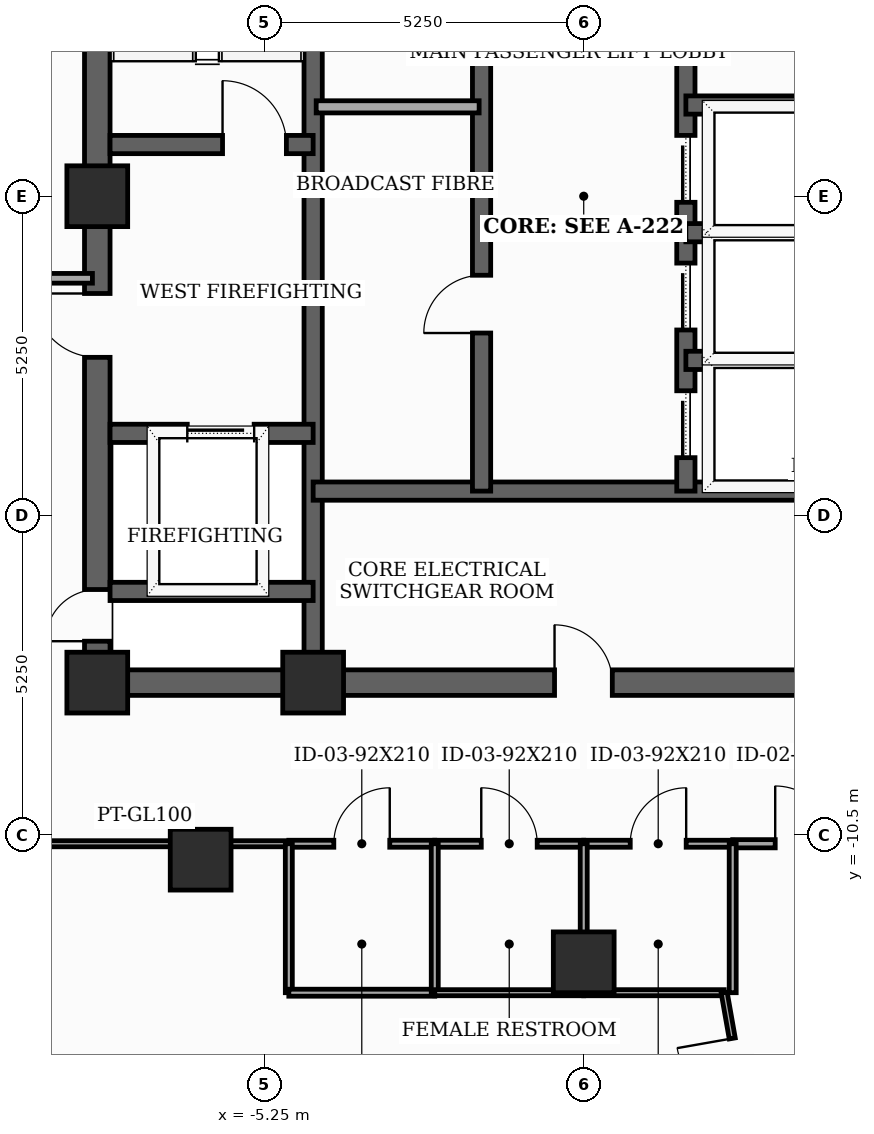
"""IFC4 building model, lengths in metres.
Left out: names, types, materials, properties, quantities, classifications, styles, units other than length and angle.
Written with IfcOpenShell. Run it as: python <this file> out.ifc"""

import sys

from ifc_helpers import new_model, si_unit, direction, frame, frame_2d, origin, origin_2d, place, context, subcontext, project, spatial, rectangle, extrude, element, fill, save


model = new_model("IFC4")
c1 = context("Model", 3, precision=1e-05, world=origin(), true_north=direction((0.0, 1.0)))
c2 = subcontext(c1, "Body", "Model", "MODEL_VIEW")
j1 = project(units=[si_unit("LENGTHUNIT", "METRE"), si_unit("PLANEANGLEUNIT", "RADIAN")], contexts=[c1])
p1 = place(None, origin())
s1 = spatial("IfcSite", under=j1, at=p1, CompositionType="ELEMENT")
p2 = place(p1, origin())
s2 = spatial("IfcBuilding", under=s1, at=p2, CompositionType="ELEMENT")
p3 = place(p2, frame((0.0, 0.0, 248.5)))
s3 = spatial("IfcBuildingStorey", under=s2, at=p3, CompositionType="ELEMENT", Elevation=248.5)
for number, where, z_axis, x_axis in (
    (1, (-8.0, -8.0, 0.0), (0.0, 0.0, 1.0), (1.0, 0.0, 0.0)),
    (2, (-4.45, -8.0, 0.0), (0.0, 0.0, 1.0), (1.0, 0.0, 0.0)),
    (3, (-8.0, 0.0, 0.0), (0.0, 0.0, 1.0), (1.0, 0.0, 0.0)),
    (4, (-6.3, -10.912, 0.0), (0.0, 0.0, 1.0), (1.0, 0.0, 0.0)),
    (5, (0.0, -12.6, 0.0), (0.0, 0.0, 1.0), (1.0, 0.0, 0.0)),
):
    element("IfcColumn", number, at=place(p3, frame(where, z_axis=z_axis, x_axis=x_axis)), inside=s3, PredefinedType="COLUMN", context=c2, shape_type="SweptSolid", body=[
        extrude(rectangle(XDim=1.0, YDim=1.0, at=origin_2d()), origin(), (0.0, 0.0, 1.0), 3.7),
    ])
p4 = place(p3, frame((-8.0, -8.0, 0.0), z_axis=(0.0, 0.0, 1.0), x_axis=(0.0, 1.0, 0.0)))
e6 = element("IfcWall", 6, at=p4, inside=s3, PredefinedType="SHEAR", context=c2, shape_type="SweptSolid", body=[
    extrude(rectangle(XDim=16.0, YDim=0.42, at=frame_2d((8.0, 0.0))), origin(), (0.0, 0.0, 1.0), 3.5),
])
p5 = place(p4, frame((0.681, 0.0, 0.0)))
e7 = element("IfcOpeningElement", 7, at=p5, cuts=e6, PredefinedType="OPENING", context=c2, shape_type="SweptSolid", body=[
    extrude(rectangle(XDim=0.85, YDim=2.02, at=frame_2d((0.425, 1.01))), frame((0.0, 0.22, 0.0), z_axis=(0.0, -1.0, 0.0), x_axis=(1.0, 0.0, 0.0)), (0.0, 0.0, 1.0), 0.44),
])
p6 = place(p4, frame((5.35, 0.0, 0.0)))
e8 = element("IfcOpeningElement", 8, at=p6, cuts=e6, PredefinedType="OPENING", context=c2, shape_type="SweptSolid", body=[
    extrude(rectangle(XDim=1.05, YDim=2.15, at=frame_2d((0.525, 1.075))), frame((0.0, 0.22, 0.0), z_axis=(0.0, -1.0, 0.0), x_axis=(1.0, 0.0, 0.0)), (0.0, 0.0, 1.0), 0.44),
])
p7 = place(p3, frame((-8.0, -8.0, 0.0), z_axis=(0.0, 0.0, 1.0), x_axis=(1.0, 0.0, 0.0)))
e9 = element("IfcWall", 9, at=p7, inside=s3, PredefinedType="SHEAR", context=c2, shape_type="SweptSolid", body=[
    extrude(rectangle(XDim=16.0, YDim=0.42, at=frame_2d((8.0, 0.0))), origin(), (0.0, 0.0, 1.0), 3.5),
])
p8 = place(p7, frame((7.52, 0.0, 0.0)))
e10 = element("IfcOpeningElement", 10, at=p8, cuts=e9, PredefinedType="OPENING", context=c2, shape_type="SweptSolid", body=[
    extrude(rectangle(XDim=0.95, YDim=2.1, at=frame_2d((0.475, 1.05))), frame((0.0, 0.22, 0.0), z_axis=(0.0, -1.0, 0.0), x_axis=(1.0, 0.0, 0.0)), (0.0, 0.0, 1.0), 0.44),
])
p9 = place(p3, frame((-4.45, -7.79, 0.0), z_axis=(0.0, 0.0, 1.0), x_axis=(0.0, 1.0, 0.0)))
e11 = element("IfcWall", 11, at=p9, inside=s3, PredefinedType="SHEAR", context=c2, shape_type="SweptSolid", body=[
    extrude(rectangle(XDim=15.58, YDim=0.3, at=frame_2d((7.79, 0.0))), origin(), (0.0, 0.0, 1.0), 3.5),
])
p10 = place(p3, frame((-7.79, 0.85, 0.0), z_axis=(0.0, 0.0, 1.0), x_axis=(1.0, 0.0, 0.0)))
e12 = element("IfcWall", 12, at=p10, inside=s3, PredefinedType="SHEAR", context=c2, shape_type="SweptSolid", body=[
    extrude(rectangle(XDim=3.34, YDim=0.3, at=frame_2d((1.67, 0.0))), origin(), (0.0, 0.0, 1.0), 3.5),
])
p11 = place(p10, frame((1.85, 0.0, 0.0)))
e13 = element("IfcOpeningElement", 13, at=p11, cuts=e12, PredefinedType="OPENING", context=c2, shape_type="SweptSolid", body=[
    extrude(rectangle(XDim=1.05, YDim=2.15, at=frame_2d((0.525, 1.075))), frame((0.0, 0.16, 0.0), z_axis=(0.0, -1.0, 0.0), x_axis=(1.0, 0.0, 0.0)), (0.0, 0.0, 1.0), 0.32),
])
p12 = place(p3, frame((-7.79, -3.9, 0.0), z_axis=(0.0, 0.0, 1.0), x_axis=(1.0, 0.0, 0.0)))
e14 = element("IfcWall", 14, at=p12, inside=s3, PredefinedType="SHEAR", context=c2, shape_type="SweptSolid", body=[
    extrude(rectangle(XDim=3.34, YDim=0.3, at=frame_2d((1.67, 0.0))), origin(), (0.0, 0.0, 1.0), 3.5),
])
p13 = place(p12, frame((1.27, 0.0, 0.0)))
e15 = element("IfcOpeningElement", 15, at=p13, cuts=e14, PredefinedType="OPENING", context=c2, shape_type="SweptSolid", body=[
    extrude(rectangle(XDim=1.1, YDim=2.1, at=frame_2d((0.55, 1.05))), frame((0.0, 0.16, 0.0), z_axis=(0.0, -1.0, 0.0), x_axis=(1.0, 0.0, 0.0)), (0.0, 0.0, 1.0), 0.32),
])
p14 = place(p3, frame((-7.79, -6.5, 0.0), z_axis=(0.0, 0.0, 1.0), x_axis=(1.0, 0.0, 0.0)))
e16 = element("IfcWall", 16, at=p14, inside=s3, PredefinedType="SHEAR", context=c2, shape_type="SweptSolid", body=[
    extrude(rectangle(XDim=3.34, YDim=0.3, at=frame_2d((1.67, 0.0))), origin(), (0.0, 0.0, 1.0), 3.5),
])
p15 = place(p3, frame((-4.45, -4.85, 0.0), z_axis=(0.0, 0.0, 1.0), x_axis=(1.0, 0.0, 0.0)))
e17 = element("IfcWall", 17, at=p15, inside=s3, PredefinedType="SHEAR", context=c2, shape_type="SweptSolid", body=[
    extrude(rectangle(XDim=8.9, YDim=0.3, at=frame_2d((4.45, 0.0))), origin(), (0.0, 0.0, 1.0), 3.5),
])
p16 = place(p3, frame((-1.68, -4.85, 0.0), z_axis=(0.0, 0.0, 1.0), x_axis=(0.0, 1.0, 0.0)))
e18 = element("IfcWall", 18, at=p16, inside=s3, PredefinedType="SHEAR", context=c2, shape_type="SweptSolid", body=[
    extrude(rectangle(XDim=12.64, YDim=0.3, at=frame_2d((6.32, 0.0))), origin(), (0.0, 0.0, 1.0), 3.5),
])
p17 = place(p16, frame((2.6, 0.0, 0.0)))
e19 = element("IfcOpeningElement", 19, at=p17, cuts=e18, PredefinedType="OPENING", context=c2, shape_type="SweptSolid", body=[
    extrude(rectangle(XDim=0.95, YDim=2.1, at=frame_2d((0.475, 1.05))), frame((0.0, 0.16, 0.0), z_axis=(0.0, -1.0, 0.0), x_axis=(1.0, 0.0, 0.0)), (0.0, 0.0, 1.0), 0.32),
])
p18 = place(p16, frame((8.8, 0.0, 0.0)))
e20 = element("IfcOpeningElement", 20, at=p18, cuts=e18, PredefinedType="OPENING", context=c2, shape_type="SweptSolid", body=[
    extrude(rectangle(XDim=0.95, YDim=2.1, at=frame_2d((0.475, 1.05))), frame((0.0, 0.16, 0.0), z_axis=(0.0, -1.0, 0.0), x_axis=(1.0, 0.0, 0.0)), (0.0, 0.0, 1.0), 0.32),
])
p19 = place(p3, frame((1.68, -4.85, 0.0), z_axis=(0.0, 0.0, 1.0), x_axis=(0.0, 1.0, 0.0)))
e21 = element("IfcWall", 21, at=p19, inside=s3, PredefinedType="SHEAR", context=c2, shape_type="SweptSolid", body=[
    extrude(rectangle(XDim=12.64, YDim=0.3, at=frame_2d((6.32, 0.0))), origin(), (0.0, 0.0, 1.0), 3.5),
])
p20 = place(p19, frame((0.55, 0.0, 0.0)))
e22 = element("IfcOpeningElement", 22, at=p20, cuts=e21, PredefinedType="OPENING", context=c2, shape_type="SweptSolid", body=[
    extrude(rectangle(XDim=1.1, YDim=2.1, at=frame_2d((0.55, 1.05))), frame((0.0, 0.16, 0.0), z_axis=(0.0, -1.0, 0.0), x_axis=(1.0, 0.0, 0.0)), (0.0, 0.0, 1.0), 0.32),
])
p21 = place(p19, frame((2.65, 0.0, 0.0)))
e23 = element("IfcOpeningElement", 23, at=p21, cuts=e21, PredefinedType="OPENING", context=c2, shape_type="SweptSolid", body=[
    extrude(rectangle(XDim=1.1, YDim=2.1, at=frame_2d((0.55, 1.05))), frame((0.0, 0.16, 0.0), z_axis=(0.0, -1.0, 0.0), x_axis=(1.0, 0.0, 0.0)), (0.0, 0.0, 1.0), 0.32),
])
p22 = place(p19, frame((4.75, 0.0, 0.0)))
e24 = element("IfcOpeningElement", 24, at=p22, cuts=e21, PredefinedType="OPENING", context=c2, shape_type="SweptSolid", body=[
    extrude(rectangle(XDim=1.1, YDim=2.1, at=frame_2d((0.55, 1.05))), frame((0.0, 0.16, 0.0), z_axis=(0.0, -1.0, 0.0), x_axis=(1.0, 0.0, 0.0)), (0.0, 0.0, 1.0), 0.32),
])
p23 = place(p19, frame((8.9, 0.0, 0.0)))
e25 = element("IfcOpeningElement", 25, at=p23, cuts=e21, PredefinedType="OPENING", context=c2, shape_type="SweptSolid", body=[
    extrude(rectangle(XDim=0.95, YDim=2.1, at=frame_2d((0.475, 1.05))), frame((0.0, 0.16, 0.0), z_axis=(0.0, -1.0, 0.0), x_axis=(1.0, 0.0, 0.0)), (0.0, 0.0, 1.0), 0.32),
])
for number, where, z_axis, x_axis in (
    (26, (1.68, 1.5, 0.0), (0.0, 0.0, 1.0), (1.0, 0.0, 0.0)),
    (27, (1.68, -2.7, 0.0), (0.0, 0.0, 1.0), (1.0, 0.0, 0.0)),
    (28, (1.68, -0.6, 0.0), (0.0, 0.0, 1.0), (1.0, 0.0, 0.0)),
):
    element("IfcWall", number, at=place(p3, frame(where, z_axis=z_axis, x_axis=x_axis)), inside=s3, PredefinedType="SHEAR", context=c2, shape_type="SweptSolid", body=[
        extrude(rectangle(XDim=2.77, YDim=0.3, at=frame_2d((1.385, 0.0))), origin(), (0.0, 0.0, 1.0), 3.5),
    ])
p24 = place(p3, frame((-4.4, 1.47, 0.0), z_axis=(0.0, 0.0, 1.0), x_axis=(1.0, 0.0, 0.0)))
e29 = element("IfcWall", 29, at=p24, inside=s3, PredefinedType="SOLIDWALL", context=c2, shape_type="SweptSolid", body=[
    extrude(rectangle(XDim=2.68, YDim=0.2, at=frame_2d((1.34, 0.0))), origin(), (0.0, 0.0, 1.0), 3.5),
])
p25 = place(p3, frame((-8.08, -1.35, 0.0), z_axis=(0.0, 0.0, 1.0), x_axis=(-1.0, 0.0, 0.0)))
e30 = element("IfcWall", 30, at=p25, inside=s3, PredefinedType="PARTITIONING", context=c2, shape_type="SweptSolid", body=[
    extrude(rectangle(XDim=2.57, YDim=0.16, at=frame_2d((1.285, 0.0))), origin(), (0.0, 0.0, 1.0), 2.885),
])
p26 = place(p3, frame((-4.85, -10.65, 0.0), z_axis=(0.0, 0.0, 1.0), x_axis=(1.0, 0.0, 0.0)))
e31 = element("IfcWall", 31, at=p26, inside=s3, PredefinedType="PARTITIONING", context=c2, shape_type="SweptSolid", body=[
    extrude(rectangle(XDim=2.4, YDim=0.115, at=frame_2d((1.2, 0.0))), origin(), (0.0, 0.0, 1.0), 3.5),
])
p27 = place(p26, frame((0.74, 0.0, 0.0)))
e32 = element("IfcOpeningElement", 32, at=p27, cuts=e31, PredefinedType="OPENING", context=c2, shape_type="SweptSolid", body=[
    extrude(rectangle(XDim=0.92, YDim=2.1, at=frame_2d((0.46, 1.05))), frame((0.0, 0.067, 0.0), z_axis=(0.0, -1.0, 0.0), x_axis=(1.0, 0.0, 0.0)), (0.0, 0.0, 1.0), 0.135),
])
p28 = place(p3, frame((-9.589, -10.65, 0.0), z_axis=(0.0, 0.0, 1.0), x_axis=(1.0, 0.0, 0.0)))
e33 = element("IfcWall", 33, at=p28, inside=s3, PredefinedType="MOVABLE", context=c2, shape_type="SweptSolid", body=[
    extrude(rectangle(XDim=4.739, YDim=0.1, at=frame_2d((2.37, 0.0))), origin(), (0.0, 0.0, 1.0), 2.885),
])
p29 = place(p3, frame((-2.45, -10.65, 0.0), z_axis=(0.0, 0.0, 1.0), x_axis=(1.0, 0.0, 0.0)))
e34 = element("IfcWall", 34, at=p29, inside=s3, PredefinedType="PARTITIONING", context=c2, shape_type="SweptSolid", body=[
    extrude(rectangle(XDim=2.45, YDim=0.115, at=frame_2d((1.225, 0.0))), origin(), (0.0, 0.0, 1.0), 2.885),
])
p30 = place(p29, frame((0.765, 0.0, 0.0)))
e35 = element("IfcOpeningElement", 35, at=p30, cuts=e34, PredefinedType="OPENING", context=c2, shape_type="SweptSolid", body=[
    extrude(rectangle(XDim=0.92, YDim=2.1, at=frame_2d((0.46, 1.05))), frame((0.0, 0.067, 0.0), z_axis=(0.0, -1.0, 0.0), x_axis=(1.0, 0.0, 0.0)), (0.0, 0.0, 1.0), 0.135),
])
p31 = place(p3, frame((0.0, -10.65, 0.0), z_axis=(0.0, 0.0, 1.0), x_axis=(1.0, 0.0, 0.0)))
e36 = element("IfcWall", 36, at=p31, inside=s3, PredefinedType="PARTITIONING", context=c2, shape_type="SweptSolid", body=[
    extrude(rectangle(XDim=2.45, YDim=0.115, at=frame_2d((1.225, 0.0))), origin(), (0.0, 0.0, 1.0), 3.5),
])
p32 = place(p31, frame((0.765, 0.0, 0.0)))
e37 = element("IfcOpeningElement", 37, at=p32, cuts=e36, PredefinedType="OPENING", context=c2, shape_type="SweptSolid", body=[
    extrude(rectangle(XDim=0.92, YDim=2.1, at=frame_2d((0.46, 1.05))), frame((0.0, 0.067, 0.0), z_axis=(0.0, -1.0, 0.0), x_axis=(1.0, 0.0, 0.0)), (0.0, 0.0, 1.0), 0.135),
])
p33 = place(p3, frame((2.45, -10.65, 0.0), z_axis=(0.0, 0.0, 1.0), x_axis=(1.0, 0.0, 0.0)))
e38 = element("IfcWall", 38, at=p33, inside=s3, PredefinedType="PARTITIONING", context=c2, shape_type="SweptSolid", body=[
    extrude(rectangle(XDim=5.871, YDim=0.135, at=frame_2d((2.936, 0.0))), origin(), (0.0, 0.0, 1.0), 2.075),
])
p34 = place(p33, frame((0.699, 0.0, 0.0)))
e39 = element("IfcOpeningElement", 39, at=p34, cuts=e38, PredefinedType="OPENING", context=c2, shape_type="SweptSolid", body=[
    extrude(rectangle(XDim=0.95, YDim=2.025, at=frame_2d((0.475, 1.012))), frame((0.0, 0.077, 0.0), z_axis=(0.0, -1.0, 0.0), x_axis=(1.0, 0.0, 0.0)), (0.0, 0.0, 1.0), 0.155),
])
p35 = place(p3, frame((-4.85, -10.65, 0.0), z_axis=(0.0, 0.0, 1.0), x_axis=(0.0, -1.0, 0.0)))
e40 = element("IfcWall", 40, at=p35, inside=s3, PredefinedType="PARTITIONING", context=c2, shape_type="SweptSolid", body=[
    extrude(rectangle(XDim=2.45, YDim=0.115, at=frame_2d((1.225, 0.0))), origin(), (0.0, 0.0, 1.0), 2.885),
])
p36 = place(p3, frame((-4.85, -13.1, 0.0), z_axis=(0.0, 0.0, 1.0), x_axis=(1.0, 0.0, 0.0)))
e41 = element("IfcWall", 41, at=p36, inside=s3, PredefinedType="PARTITIONING", context=c2, shape_type="SweptSolid", body=[
    extrude(rectangle(XDim=2.4, YDim=0.115, at=frame_2d((1.2, 0.0))), origin(), (0.0, 0.0, 1.0), 3.5),
])
p37 = place(p3, frame((-2.45, -13.1, 0.0), z_axis=(0.0, 0.0, 1.0), x_axis=(0.0, 1.0, 0.0)))
e42 = element("IfcWall", 42, at=p37, inside=s3, PredefinedType="PARTITIONING", context=c2, shape_type="SweptSolid", body=[
    extrude(rectangle(XDim=2.45, YDim=0.115, at=frame_2d((1.225, 0.0))), origin(), (0.0, 0.0, 1.0), 2.885),
])
p38 = place(p3, frame((0.0, -13.1, 0.0), z_axis=(0.0, 0.0, 1.0), x_axis=(-1.0, 0.0, 0.0)))
e43 = element("IfcWall", 43, at=p38, inside=s3, PredefinedType="MOVABLE", context=c2, shape_type="SweptSolid", body=[
    extrude(rectangle(XDim=2.45, YDim=0.1, at=frame_2d((1.225, 0.0))), origin(), (0.0, 0.0, 1.0), 3.5),
])
p39 = place(p3, frame((2.31, -13.1, 0.0), z_axis=(0.0, 0.0, 1.0), x_axis=(-1.0, 0.0, 0.0)))
e44 = element("IfcWall", 44, at=p39, inside=s3, PredefinedType="MOVABLE", context=c2, shape_type="SweptSolid", body=[
    extrude(rectangle(XDim=2.31, YDim=0.1, at=frame_2d((1.155, 0.0))), origin(), (0.0, 0.0, 1.0), 3.5),
])
p40 = place(p3, frame((2.735, -15.51, 0.0), z_axis=(0.0, 0.0, 1.0), x_axis=(-0.173694270709, 0.984799624453, 0.0)))
e45 = element("IfcWall", 45, at=p40, inside=s3, PredefinedType="MOVABLE", context=c2, shape_type="SweptSolid", body=[
    extrude(rectangle(XDim=2.447, YDim=0.1, at=frame_2d((1.224, 0.0))), origin(), (0.0, 0.0, 1.0), 3.185),
])
p41 = place(p40, frame((0.764, 0.0, 0.0)))
e46 = element("IfcOpeningElement", 46, at=p41, cuts=e45, PredefinedType="OPENING", context=c2, shape_type="SweptSolid", body=[
    extrude(rectangle(XDim=0.92, YDim=2.1, at=frame_2d((0.46, 1.05))), frame((0.0, 0.06, 0.0), z_axis=(0.0, -1.0, 0.0), x_axis=(1.0, 0.0, 0.0)), (0.0, 0.0, 1.0), 0.12),
])
for number, where, z_axis, x_axis in (
    (47, (0.0, -13.1, 0.0), (0.0, 0.0, 1.0), (0.0, 1.0, 0.0)),
    (48, (2.45, -13.1, 0.0), (0.0, 0.0, 1.0), (0.0, 1.0, 0.0)),
):
    element("IfcWall", number, at=place(p3, frame(where, z_axis=z_axis, x_axis=x_axis)), inside=s3, PredefinedType="PARTITIONING", context=c2, shape_type="SweptSolid", body=[
        extrude(rectangle(XDim=2.45, YDim=0.115, at=frame_2d((1.225, 0.0))), origin(), (0.0, 0.0, 1.0), 2.885),
    ])
p42 = place(p5, origin())
e49 = element("IfcDoor", 49, at=p42, inside=s3, OperationType="SINGLE_SWING_LEFT", PredefinedType="TRAPDOOR", context=c2, shape_type="SweptSolid", body=[
    extrude(rectangle(XDim=0.85, YDim=2.02, at=frame_2d((0.425, 1.01))), frame((0.0, 0.025, 0.0), z_axis=(0.0, -1.0, 0.0), x_axis=(1.0, 0.0, 0.0)), (0.0, 0.0, 1.0), 0.05),
])
fill(e7, e49)
p43 = place(p6, origin())
e50 = element("IfcDoor", 50, at=p43, inside=s3, OperationType="SINGLE_SWING_RIGHT", PredefinedType="DOOR", context=c2, shape_type="SweptSolid", body=[
    extrude(rectangle(XDim=1.05, YDim=2.15, at=frame_2d((0.525, 1.075))), frame((0.0, 0.025, 0.0), z_axis=(0.0, -1.0, 0.0), x_axis=(1.0, 0.0, 0.0)), (0.0, 0.0, 1.0), 0.05),
])
fill(e8, e50)
p44 = place(p8, origin())
e51 = element("IfcDoor", 51, at=p44, inside=s3, OperationType="SINGLE_SWING_LEFT", PredefinedType="DOOR", context=c2, shape_type="SweptSolid", body=[
    extrude(rectangle(XDim=0.95, YDim=2.1, at=frame_2d((0.475, 1.05))), frame((0.0, 0.025, 0.0), z_axis=(0.0, -1.0, 0.0), x_axis=(1.0, 0.0, 0.0)), (0.0, 0.0, 1.0), 0.05),
])
fill(e10, e51)
p45 = place(p11, origin())
e52 = element("IfcDoor", 52, at=p45, inside=s3, OperationType="SINGLE_SWING_LEFT", PredefinedType="DOOR", context=c2, shape_type="SweptSolid", body=[
    extrude(rectangle(XDim=1.05, YDim=2.15, at=frame_2d((0.525, 1.075))), frame((0.0, 0.025, 0.0), z_axis=(0.0, -1.0, 0.0), x_axis=(1.0, 0.0, 0.0)), (0.0, 0.0, 1.0), 0.05),
])
fill(e13, e52)
p46 = place(p13, origin())
e53 = element("IfcDoor", 53, at=p46, inside=s3, OperationType="SLIDING_TO_LEFT", PredefinedType="DOOR", context=c2, shape_type="SweptSolid", body=[
    extrude(rectangle(XDim=1.1, YDim=2.1, at=frame_2d((0.55, 1.05))), frame((0.0, 0.025, 0.0), z_axis=(0.0, -1.0, 0.0), x_axis=(1.0, 0.0, 0.0)), (0.0, 0.0, 1.0), 0.05),
])
fill(e15, e53)
p47 = place(p17, origin())
e54 = element("IfcDoor", 54, at=p47, inside=s3, OperationType="SINGLE_SWING_LEFT", PredefinedType="DOOR", context=c2, shape_type="SweptSolid", body=[
    extrude(rectangle(XDim=0.95, YDim=2.1, at=frame_2d((0.475, 1.05))), frame((0.0, 0.025, 0.0), z_axis=(0.0, -1.0, 0.0), x_axis=(1.0, 0.0, 0.0)), (0.0, 0.0, 1.0), 0.05),
])
fill(e19, e54)
p48 = place(p20, origin())
e55 = element("IfcDoor", 55, at=p48, inside=s3, OperationType="SLIDING_TO_LEFT", PredefinedType="DOOR", context=c2, shape_type="SweptSolid", body=[
    extrude(rectangle(XDim=1.1, YDim=2.1, at=frame_2d((0.55, 1.05))), frame((0.0, 0.025, 0.0), z_axis=(0.0, -1.0, 0.0), x_axis=(1.0, 0.0, 0.0)), (0.0, 0.0, 1.0), 0.05),
])
fill(e22, e55)
p49 = place(p21, origin())
e56 = element("IfcDoor", 56, at=p49, inside=s3, OperationType="SLIDING_TO_LEFT", PredefinedType="DOOR", context=c2, shape_type="SweptSolid", body=[
    extrude(rectangle(XDim=1.1, YDim=2.1, at=frame_2d((0.55, 1.05))), frame((0.0, 0.025, 0.0), z_axis=(0.0, -1.0, 0.0), x_axis=(1.0, 0.0, 0.0)), (0.0, 0.0, 1.0), 0.05),
])
fill(e23, e56)
p50 = place(p22, origin())
e57 = element("IfcDoor", 57, at=p50, inside=s3, OperationType="SLIDING_TO_LEFT", PredefinedType="DOOR", context=c2, shape_type="SweptSolid", body=[
    extrude(rectangle(XDim=1.1, YDim=2.1, at=frame_2d((0.55, 1.05))), frame((0.0, 0.025, 0.0), z_axis=(0.0, -1.0, 0.0), x_axis=(1.0, 0.0, 0.0)), (0.0, 0.0, 1.0), 0.05),
])
fill(e24, e57)
p51 = place(p27, origin())
e58 = element("IfcDoor", 58, at=p51, inside=s3, OperationType="SINGLE_SWING_RIGHT", PredefinedType="DOOR", context=c2, shape_type="SweptSolid", body=[
    extrude(rectangle(XDim=0.92, YDim=2.1, at=frame_2d((0.46, 1.05))), frame((0.0, 0.025, 0.0), z_axis=(0.0, -1.0, 0.0), x_axis=(1.0, 0.0, 0.0)), (0.0, 0.0, 1.0), 0.05),
])
fill(e32, e58)
p52 = place(p30, origin())
e59 = element("IfcDoor", 59, at=p52, inside=s3, OperationType="SINGLE_SWING_LEFT", PredefinedType="DOOR", context=c2, shape_type="SweptSolid", body=[
    extrude(rectangle(XDim=0.92, YDim=2.1, at=frame_2d((0.46, 1.05))), frame((0.0, 0.025, 0.0), z_axis=(0.0, -1.0, 0.0), x_axis=(1.0, 0.0, 0.0)), (0.0, 0.0, 1.0), 0.05),
])
fill(e35, e59)
p53 = place(p32, origin())
e60 = element("IfcDoor", 60, at=p53, inside=s3, OperationType="SINGLE_SWING_RIGHT", PredefinedType="DOOR", context=c2, shape_type="SweptSolid", body=[
    extrude(rectangle(XDim=0.92, YDim=2.1, at=frame_2d((0.46, 1.05))), frame((0.0, 0.025, 0.0), z_axis=(0.0, -1.0, 0.0), x_axis=(1.0, 0.0, 0.0)), (0.0, 0.0, 1.0), 0.05),
])
fill(e37, e60)
p54 = place(p34, origin())
e61 = element("IfcDoor", 61, at=p54, inside=s3, OperationType="SINGLE_SWING_LEFT", PredefinedType="DOOR", context=c2, shape_type="SweptSolid", body=[
    extrude(rectangle(XDim=0.95, YDim=2.025, at=frame_2d((0.475, 1.012))), frame((0.0, 0.025, 0.0), z_axis=(0.0, -1.0, 0.0), x_axis=(1.0, 0.0, 0.0)), (0.0, 0.0, 1.0), 0.05),
])
fill(e39, e61)
p55 = place(p41, origin())
e62 = element("IfcDoor", 62, at=p55, inside=s3, OperationType="SINGLE_SWING_RIGHT", PredefinedType="DOOR", context=c2, shape_type="SweptSolid", body=[
    extrude(rectangle(XDim=0.92, YDim=2.1, at=frame_2d((0.46, 1.05))), frame((0.0, 0.025, 0.0), z_axis=(0.0, -1.0, 0.0), x_axis=(1.0, 0.0, 0.0)), (0.0, 0.0, 1.0), 0.05),
])
fill(e46, e62)
save(model, sys.argv[1])
